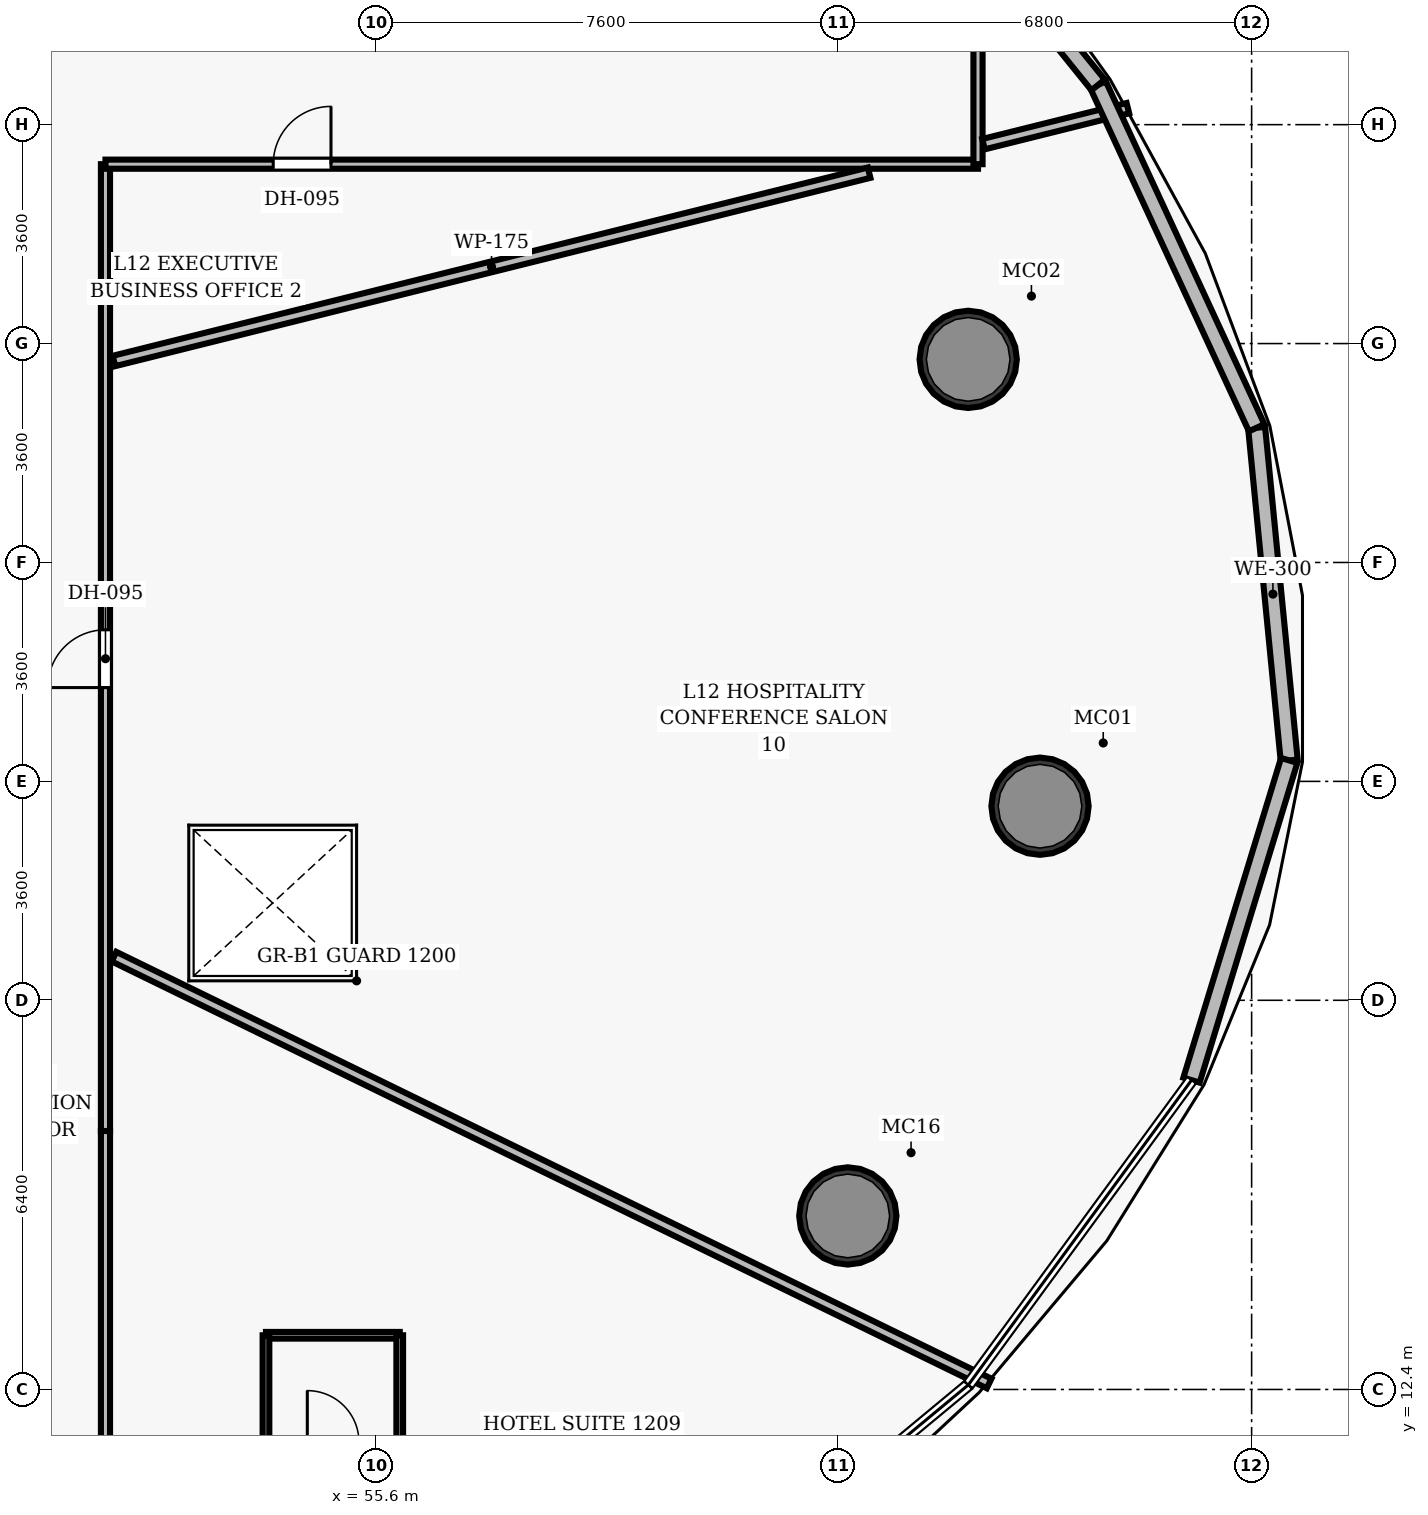
"""IFC4 building model, lengths in metres.
Left out: names, types, materials, properties, quantities, classifications, styles, units other than length and angle.
Written with IfcOpenShell. Run it as: python <this file> out.ifc"""

import sys

from ifc_helpers import new_model, si_unit, direction, frame, frame_2d, origin, origin_2d, place, context, subcontext, project, spatial, rectangle, hollow_circle, extrude, element, fill, save


model = new_model("IFC4")
c1 = context("Model", 3, precision=1e-05, world=origin(), true_north=direction((0.0, 1.0)))
c2 = subcontext(c1, "Body", "Model", "MODEL_VIEW")
j1 = project(units=[si_unit("LENGTHUNIT", "METRE"), si_unit("PLANEANGLEUNIT", "RADIAN")], contexts=[c1])
p1 = place(None, origin())
s1 = spatial("IfcSite", under=j1, at=p1, CompositionType="ELEMENT")
p2 = place(p1, origin())
s2 = spatial("IfcBuilding", under=s1, at=p2, CompositionType="ELEMENT")
p3 = place(p2, frame((0.0, 0.0, 58.9)))
s3 = spatial("IfcBuildingStorey", under=s2, at=p3, CompositionType="ELEMENT", Elevation=58.9)
for number, where, z_axis, x_axis in (
    (1, (66.52, 21.992, 0.0), (0.0, 0.0, 1.0), (1.0, 0.0, 0.0)),
    (2, (65.339, 29.34, 0.0), (0.0, 0.0, 1.0), (1.0, 0.0, 0.0)),
    (3, (63.359, 15.254, 0.0), (0.0, 0.0, 1.0), (1.0, 0.0, 0.0)),
):
    element("IfcColumn", number, at=place(p3, frame(where, z_axis=z_axis, x_axis=x_axis)), inside=s3, PredefinedType="COLUMN", context=c2, shape_type="SweptSolid", body=[
        extrude(hollow_circle(Radius=0.8, WallThickness=0.06, at=origin_2d()), origin(), (0.0, 0.0, 1.0), 3.5),
    ])
p4 = place(p3, frame((51.15, 16.65, 0.0), z_axis=(0.0, 0.0, 1.0), x_axis=(0.0, 1.0, 0.0)))
e4 = element("IfcWall", 4, at=p4, inside=s3, PredefinedType="PARTITIONING", context=c2, shape_type="SweptSolid", body=[
    extrude(rectangle(XDim=15.9, YDim=0.15, at=frame_2d((7.95, 0.0))), origin(), (0.0, 0.0, 1.0), 2.6),
])
p5 = place(p4, frame((7.292, 0.0, 0.0)))
e5 = element("IfcOpeningElement", 5, at=p5, cuts=e4, PredefinedType="OPENING", context=c2, shape_type="SweptSolid", body=[
    extrude(rectangle(XDim=0.95, YDim=2.15, at=frame_2d((0.475, 1.075))), frame((0.0, 0.085, 0.0), z_axis=(0.0, -1.0, 0.0), x_axis=(1.0, 0.0, 0.0)), (0.0, 0.0, 1.0), 0.17),
])
p6 = place(p3, frame((51.15, 32.55, 0.0), z_axis=(0.0, 0.0, 1.0), x_axis=(1.0, 0.0, 0.0)))
e6 = element("IfcWall", 6, at=p6, inside=s3, PredefinedType="PARTITIONING", context=c2, shape_type="SweptSolid", body=[
    extrude(rectangle(XDim=14.35, YDim=0.15, at=frame_2d((7.175, 0.0))), origin(), (0.0, 0.0, 1.0), 2.6),
])
p7 = place(p6, frame((2.759, 0.0, 0.0)))
e7 = element("IfcOpeningElement", 7, at=p7, cuts=e6, PredefinedType="OPENING", context=c2, shape_type="SweptSolid", body=[
    extrude(rectangle(XDim=0.95, YDim=2.15, at=frame_2d((0.475, 1.075))), frame((0.0, 0.085, 0.0), z_axis=(0.0, -1.0, 0.0), x_axis=(1.0, 0.0, 0.0)), (0.0, 0.0, 1.0), 0.17),
])
p8 = place(p3, frame((65.5, 32.55, 0.0), z_axis=(0.0, 0.0, 1.0), x_axis=(0.0, 1.0, 0.0)))
e8 = element("IfcWall", 8, at=p8, inside=s3, PredefinedType="PARTITIONING", context=c2, shape_type="SweptSolid", body=[
    extrude(rectangle(XDim=2.8, YDim=0.15, at=frame_2d((1.4, 0.0))), origin(), (0.0, 0.0, 1.0), 2.6),
])
p9 = place(p3, frame((51.15, 6.5, 0.0), z_axis=(0.0, 0.0, 1.0), x_axis=(0.0, 1.0, 0.0)))
e9 = element("IfcWall", 9, at=p9, inside=s3, PredefinedType="PARTITIONING", context=c2, shape_type="SweptSolid", body=[
    extrude(rectangle(XDim=10.15, YDim=0.15, at=frame_2d((5.075, 0.0))), origin(), (0.0, 0.0, 1.0), 2.6),
])
p10 = place(p3, frame((51.29, 29.314, 0.0), z_axis=(0.0, 0.0, 1.0), x_axis=(0.970299383645, 0.241907226221, 0.0)))
e10 = element("IfcWall", 10, at=p10, inside=s3, PredefinedType="PARTITIONING", context=c2, shape_type="SweptSolid", body=[
    extrude(rectangle(XDim=12.799, YDim=0.175, at=frame_2d((6.399, 0.0))), origin(), (0.0, 0.0, 1.0), 2.6),
])
p11 = place(p3, frame((65.591, 32.879, 0.0), z_axis=(0.0, 0.0, 1.0), x_axis=(0.970294886869, 0.241925262251, 0.0)))
e11 = element("IfcWall", 11, at=p11, inside=s3, PredefinedType="PARTITIONING", context=c2, shape_type="SweptSolid", body=[
    extrude(rectangle(XDim=2.447, YDim=0.175, at=frame_2d((1.224, 0.0))), origin(), (0.0, 0.0, 1.0), 2.6),
])
p12 = place(p3, frame((51.29, 19.518, 0.0), z_axis=(0.0, 0.0, 1.0), x_axis=(0.898792914329, -0.438373467664, 0.0)))
e12 = element("IfcWall", 12, at=p12, inside=s3, PredefinedType="PARTITIONING", context=c2, shape_type="SweptSolid", body=[
    extrude(rectangle(XDim=16.013, YDim=0.175, at=frame_2d((8.007, 0.0))), origin(), (0.0, 0.0, 1.0), 2.6),
])
p13 = place(p3, frame((53.79, 13.291, 0.0), z_axis=(0.0, 0.0, 1.0), x_axis=(1.0, 0.0, 0.0)))
e13 = element("IfcWall", 13, at=p13, inside=s3, PredefinedType="PARTITIONING", context=c2, shape_type="SweptSolid", body=[
    extrude(rectangle(XDim=2.2, YDim=0.11, at=frame_2d((1.1, 0.0))), origin(), (0.0, 0.0, 1.0), 2.6),
])
for number, where, z_axis, x_axis in (
    (14, (53.79, 11.531, 0.0), (0.0, 0.0, 1.0), (0.0, 1.0, 0.0)),
    (15, (55.99, 11.531, 0.0), (0.0, 0.0, 1.0), (0.0, 1.0, 0.0)),
):
    element("IfcWall", number, at=place(p3, frame(where, z_axis=z_axis, x_axis=x_axis)), inside=s3, PredefinedType="PARTITIONING", context=c2, shape_type="SweptSolid", body=[
        extrude(rectangle(XDim=1.76, YDim=0.11, at=frame_2d((0.88, 0.0))), origin(), (0.0, 0.0, 1.0), 2.6),
    ])
p14 = place(p3, frame((70.083, 28.216, 0.0), z_axis=(0.0, 0.0, 1.0), x_axis=(0.09739288293, -0.995246012981, 0.0)))
e16 = element("IfcWall", 16, at=p14, inside=s3, PredefinedType="SOLIDWALL", context=c2, shape_type="SweptSolid", body=[
    extrude(rectangle(XDim=5.497, YDim=0.28, at=frame_2d((2.749, 0.0))), origin(), (0.0, 0.0, 1.0), 3.25),
])
p15 = place(p3, frame((67.475, 33.854, 0.0), z_axis=(0.0, 0.0, 1.0), x_axis=(0.41977831576, -0.907626666432, 0.0)))
e17 = element("IfcWall", 17, at=p15, inside=s3, PredefinedType="SOLIDWALL", context=c2, shape_type="SweptSolid", body=[
    extrude(rectangle(XDim=6.212, YDim=0.28, at=frame_2d((3.106, 0.0))), origin(), (0.0, 0.0, 1.0), 3.25),
])
p16 = place(p3, frame((62.986, 39.41, 0.0), z_axis=(0.0, 0.0, 1.0), x_axis=(0.628451663088, -0.777848640265, 0.0)))
e18 = element("IfcWall", 18, at=p16, inside=s3, PredefinedType="SOLIDWALL", context=c2, shape_type="SweptSolid", body=[
    extrude(rectangle(XDim=7.143, YDim=0.28, at=frame_2d((3.572, 0.0))), origin(), (0.0, 0.0, 1.0), 3.25),
])
p17 = place(p3, frame((70.618, 22.744, 0.0), z_axis=(0.0, 0.0, 1.0), x_axis=(-0.292172276323, -0.956365704607, 0.0)))
e19 = element("IfcWall", 19, at=p17, inside=s3, PredefinedType="SOLIDWALL", context=c2, shape_type="SweptSolid", body=[
    extrude(rectangle(XDim=5.498, YDim=0.28, at=frame_2d((2.749, 0.0))), origin(), (0.0, 0.0, 1.0), 3.25),
])
p18 = place(p7, origin())
e20 = element("IfcDoor", 20, at=p18, inside=s3, OperationType="SINGLE_SWING_RIGHT", PredefinedType="DOOR", context=c2, shape_type="SweptSolid", body=[
    extrude(rectangle(XDim=0.95, YDim=2.15, at=frame_2d((0.475, 1.075))), frame((0.0, 0.025, 0.0), z_axis=(0.0, -1.0, 0.0), x_axis=(1.0, 0.0, 0.0)), (0.0, 0.0, 1.0), 0.05),
])
fill(e7, e20)
p19 = place(p5, origin())
e21 = element("IfcDoor", 21, at=p19, inside=s3, OperationType="SINGLE_SWING_LEFT", PredefinedType="DOOR", context=c2, shape_type="SweptSolid", body=[
    extrude(rectangle(XDim=0.95, YDim=2.15, at=frame_2d((0.475, 1.075))), frame((0.0, 0.025, 0.0), z_axis=(0.0, -1.0, 0.0), x_axis=(1.0, 0.0, 0.0)), (0.0, 0.0, 1.0), 0.05),
])
fill(e5, e21)
save(model, sys.argv[1])
